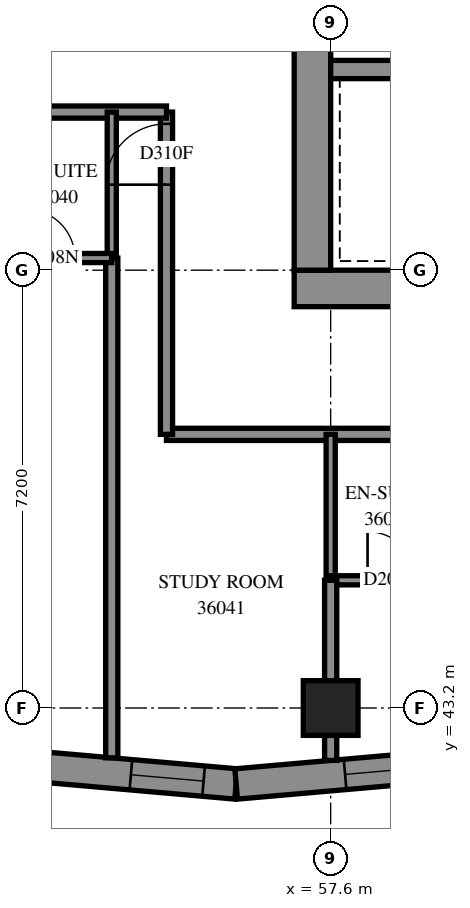
"""IFC4 building model, lengths in metres.
Left out: names, types, materials, properties, quantities, classifications, styles, units other than length and angle.
Written with IfcOpenShell. Run it as: python <this file> out.ifc"""

import sys

from ifc_helpers import new_model, si_unit, direction, frame, frame_2d, origin, origin_2d, place, context, subcontext, project, spatial, polyline, rectangle, outline, extrude, element, fill, save


model = new_model("IFC4")
c1 = context("Model", 3, precision=1e-05, world=origin(), true_north=direction((0.0, 1.0)))
c2 = subcontext(c1, "Body", "Model", "MODEL_VIEW")
j1 = project(units=[si_unit("LENGTHUNIT", "METRE"), si_unit("PLANEANGLEUNIT", "RADIAN")], contexts=[c1])
p1 = place(None, origin())
s1 = spatial("IfcSite", under=j1, at=p1, CompositionType="ELEMENT")
p2 = place(p1, origin())
s2 = spatial("IfcBuilding", under=s1, at=p2, CompositionType="ELEMENT")
p3 = place(p2, frame((0.0, 0.0, 135.4)))
s3 = spatial("IfcBuildingStorey", under=s2, at=p3, CompositionType="ELEMENT", Elevation=135.4)
p4 = place(p3, frame((57.6, 43.2, 0.0), z_axis=(0.0, 0.0, 1.0), x_axis=(1.0, 0.0, 0.0)))
e1 = element("IfcColumn", 1, at=p4, inside=s3, PredefinedType="COLUMN", context=c2, shape_type="SweptSolid", body=[
    extrude(rectangle(XDim=0.9, YDim=0.9, at=origin_2d()), origin(), (0.0, 0.0, 1.0), 3.1),
])
p5 = place(p3, frame((57.0, 50.1, -0.3), z_axis=(0.0, 0.0, 1.0), x_axis=(1.0, 0.0, 0.0)))
e2 = element("IfcWall", 2, at=p5, inside=s3, PredefinedType="SHEAR", context=c2, shape_type="SweptSolid", body=[
    extrude(rectangle(XDim=15.6, YDim=0.6, at=frame_2d((7.8, 0.0))), origin(), (0.0, 0.0, 1.0), 2.7),
])
p6 = place(p3, frame((57.3, 50.4, -0.3), z_axis=(0.0, 0.0, 1.0), x_axis=(0.0, 1.0, 0.0)))
e3 = element("IfcWall", 3, at=p6, inside=s3, PredefinedType="SHEAR", context=c2, shape_type="SweptSolid", body=[
    extrude(rectangle(XDim=14.4, YDim=0.6, at=frame_2d((7.2, 0.0))), origin(), (0.0, 0.0, 1.0), 2.7),
])
p7 = place(p6, frame((4.55, 0.0, 0.3)))
e4 = element("IfcOpeningElement", 4, at=p7, cuts=e3, PredefinedType="OPENING", context=c2, shape_type="SweptSolid", body=[
    extrude(rectangle(XDim=1.1, YDim=2.1, at=frame_2d((0.55, 1.05))), frame((0.0, 0.31, 0.0), z_axis=(0.0, -1.0, 0.0), x_axis=(1.0, 0.0, 0.0)), (0.0, 0.0, 1.0), 0.62),
])
p8 = place(p6, frame((11.35, 0.0, 0.3)))
e5 = element("IfcOpeningElement", 5, at=p8, cuts=e3, PredefinedType="OPENING", context=c2, shape_type="SweptSolid", body=[
    extrude(rectangle(XDim=1.1, YDim=2.1, at=frame_2d((0.55, 1.05))), frame((0.0, 0.31, 0.0), z_axis=(0.0, -1.0, 0.0), x_axis=(1.0, 0.0, 0.0)), (0.0, 0.0, 1.0), 0.62),
])
p9 = place(p3, frame((57.6, 53.7, 0.0), z_axis=(0.0, 0.0, 1.0), x_axis=(1.0, 0.0, 0.0)))
e6 = element("IfcWall", 6, at=p9, inside=s3, PredefinedType="SOLIDWALL", context=c2, shape_type="SweptSolid", body=[
    extrude(rectangle(XDim=14.4, YDim=0.3, at=frame_2d((7.2, 0.0))), origin(), (0.0, 0.0, 1.0), 3.1),
])
p10 = place(p9, frame((12.05, 0.0, 0.0)))
e7 = element("IfcOpeningElement", 7, at=p10, cuts=e6, PredefinedType="OPENING", context=c2, shape_type="SweptSolid", body=[
    extrude(rectangle(XDim=1.1, YDim=2.1, at=frame_2d((0.55, 1.05))), frame((0.0, 0.16, 0.0), z_axis=(0.0, -1.0, 0.0), x_axis=(1.0, 0.0, 0.0)), (0.0, 0.0, 1.0), 0.32),
])
p11 = place(p3, frame((52.601, 42.253, 0.0), z_axis=(0.0, 0.0, 1.0), x_axis=(0.9961832879, -0.0872860633, 0.0)))
e8 = element("IfcWall", 8, at=p11, inside=s3, PredefinedType="SOLIDWALL", context=c2, shape_type="SweptSolid", body=[
    extrude(outline(polyline([(0.043, -0.25), (3.479, -0.25), (3.436, 0.25), (-0.043, 0.25), (0.043, -0.25)])), origin(), (0.0, 0.0, 1.0), 3.1),
])
p12 = place(p11, frame((1.72, 0.0, 0.45)))
e9 = element("IfcOpeningElement", 9, at=p12, cuts=e8, PredefinedType="OPENING", context=c2, shape_type="SweptSolid", body=[
    extrude(rectangle(XDim=1.2, YDim=2.5, at=frame_2d((0.6, 1.25))), frame((0.0, 0.26, 0.0), z_axis=(0.0, -1.0, 0.0), x_axis=(1.0, 0.0, 0.0)), (0.0, 0.0, 1.0), 0.52),
])
p13 = place(p3, frame((56.046, 41.951, 0.0), z_axis=(0.0, 0.0, 1.0), x_axis=(0.996181166, 0.0873102778, 0.0)))
e10 = element("IfcWall", 10, at=p13, inside=s3, PredefinedType="SOLIDWALL", context=c2, shape_type="SweptSolid", body=[
    extrude(outline(polyline([(-0.022, -0.25), (3.414, -0.25), (3.458, 0.25), (0.022, 0.25), (-0.022, -0.25)])), origin(), (0.0, 0.0, 1.0), 3.1),
])
p14 = place(p13, frame((1.798, 0.0, 0.45)))
e11 = element("IfcOpeningElement", 11, at=p14, cuts=e10, PredefinedType="OPENING", context=c2, shape_type="SweptSolid", body=[
    extrude(rectangle(XDim=1.2, YDim=2.5, at=frame_2d((0.6, 1.25))), frame((0.0, 0.26, 0.0), z_axis=(0.0, -1.0, 0.0), x_axis=(1.0, 0.0, 0.0)), (0.0, 0.0, 1.0), 0.52),
])
p15 = place(p3, frame((54.9, 47.7, 0.0), z_axis=(0.0, 0.0, 1.0), x_axis=(1.0, 0.0, 0.0)))
e12 = element("IfcWall", 12, at=p15, inside=s3, PredefinedType="PARTITIONING", context=c2, shape_type="SweptSolid", body=[
    extrude(rectangle(XDim=19.326, YDim=0.2, at=frame_2d((9.663, 0.0))), origin(), (0.0, 0.0, 1.0), 3.1),
])
p16 = place(p15, frame((5.0, 0.0, 0.0)))
e13 = element("IfcOpeningElement", 13, at=p16, cuts=e12, PredefinedType="OPENING", context=c2, shape_type="SweptSolid", body=[
    extrude(rectangle(XDim=0.9, YDim=2.1, at=frame_2d((0.45, 1.05))), frame((0.0, 0.11, 0.0), z_axis=(0.0, -1.0, 0.0), x_axis=(1.0, 0.0, 0.0)), (0.0, 0.0, 1.0), 0.22),
])
p17 = place(p15, frame((12.2, 0.0, 0.0)))
e14 = element("IfcOpeningElement", 14, at=p17, cuts=e12, PredefinedType="OPENING", context=c2, shape_type="SweptSolid", body=[
    extrude(rectangle(XDim=0.9, YDim=2.1, at=frame_2d((0.45, 1.05))), frame((0.0, 0.11, 0.0), z_axis=(0.0, -1.0, 0.0), x_axis=(1.0, 0.0, 0.0)), (0.0, 0.0, 1.0), 0.22),
])
p18 = place(p15, frame((6.7, 0.0, 0.0)))
e15 = element("IfcOpeningElement", 15, at=p18, cuts=e12, PredefinedType="OPENING", context=c2, shape_type="SweptSolid", body=[
    extrude(rectangle(XDim=0.9, YDim=2.1, at=frame_2d((0.45, 1.05))), frame((0.0, 0.11, 0.0), z_axis=(0.0, -1.0, 0.0), x_axis=(1.0, 0.0, 0.0)), (0.0, 0.0, 1.0), 0.22),
])
p19 = place(p15, frame((13.9, 0.0, 0.0)))
e16 = element("IfcOpeningElement", 16, at=p19, cuts=e12, PredefinedType="OPENING", context=c2, shape_type="SweptSolid", body=[
    extrude(rectangle(XDim=0.9, YDim=2.1, at=frame_2d((0.45, 1.05))), frame((0.0, 0.11, 0.0), z_axis=(0.0, -1.0, 0.0), x_axis=(1.0, 0.0, 0.0)), (0.0, 0.0, 1.0), 0.22),
])
p20 = place(p3, frame((54.0, 42.381, 0.0), z_axis=(0.0, 0.0, 1.0), x_axis=(0.0, 1.0, 0.0)))
e17 = element("IfcWall", 17, at=p20, inside=s3, PredefinedType="PARTITIONING", context=c2, shape_type="SweptSolid", body=[
    extrude(rectangle(XDim=8.219, YDim=0.2, at=frame_2d((4.109, 0.0))), origin(), (0.0, 0.0, 1.0), 3.1),
])
p21 = place(p3, frame((54.9, 47.7, 0.0), z_axis=(0.0, 0.0, 1.0), x_axis=(0.0, 1.0, 0.0)))
e18 = element("IfcWall", 18, at=p21, inside=s3, PredefinedType="PARTITIONING", context=c2, shape_type="SweptSolid", body=[
    extrude(rectangle(XDim=5.3, YDim=0.2, at=frame_2d((2.65, 0.0))), origin(), (0.0, 0.0, 1.0), 3.1),
])
p22 = place(p21, frame((4.106, 0.0, 0.0)))
e19 = element("IfcOpeningElement", 19, at=p22, cuts=e18, PredefinedType="OPENING", context=c2, shape_type="SweptSolid", body=[
    extrude(rectangle(XDim=1.0, YDim=2.1, at=frame_2d((0.5, 1.05))), frame((0.0, 0.11, 0.0), z_axis=(0.0, -1.0, 0.0), x_axis=(1.0, 0.0, 0.0)), (0.0, 0.0, 1.0), 0.22),
])
p23 = place(p3, frame((50.4, 53.0, 0.0), z_axis=(0.0, 0.0, 1.0), x_axis=(1.0, 0.0, 0.0)))
e20 = element("IfcWall", 20, at=p23, inside=s3, PredefinedType="PARTITIONING", context=c2, shape_type="SweptSolid", body=[
    extrude(rectangle(XDim=4.5, YDim=0.2, at=frame_2d((2.25, 0.0))), origin(), (0.0, 0.0, 1.0), 3.1),
])
p24 = place(p23, frame((0.4, 0.0, 0.0)))
e21 = element("IfcOpeningElement", 21, at=p24, cuts=e20, PredefinedType="OPENING", context=c2, shape_type="SweptSolid", body=[
    extrude(rectangle(XDim=0.9, YDim=2.1, at=frame_2d((0.45, 1.05))), frame((0.0, 0.11, 0.0), z_axis=(0.0, -1.0, 0.0), x_axis=(1.0, 0.0, 0.0)), (0.0, 0.0, 1.0), 0.22),
])
for number, where, z_axis, x_axis in (
    (22, (57.6, 45.3, 0.0), (0.0, 0.0, 1.0), (0.0, 1.0, 0.0)),
    (23, (54.0, 50.6, 0.0), (0.0, 0.0, 1.0), (0.0, 1.0, 0.0)),
):
    element("IfcWall", number, at=place(p3, frame(where, z_axis=z_axis, x_axis=x_axis)), inside=s3, PredefinedType="PARTITIONING", context=c2, shape_type="SweptSolid", body=[
        extrude(rectangle(XDim=2.4, YDim=0.15, at=frame_2d((1.2, 0.0))), origin(), (0.0, 0.0, 1.0), 3.1),
    ])
p25 = place(p3, frame((52.1, 50.6, 0.0), z_axis=(0.0, 0.0, 1.0), x_axis=(1.0, 0.0, 0.0)))
e24 = element("IfcWall", 24, at=p25, inside=s3, PredefinedType="PARTITIONING", context=c2, shape_type="SweptSolid", body=[
    extrude(rectangle(XDim=1.9, YDim=0.15, at=frame_2d((0.95, 0.0))), origin(), (0.0, 0.0, 1.0), 3.1),
])
p26 = place(p25, frame((0.493, 0.0, 0.0)))
e25 = element("IfcOpeningElement", 25, at=p26, cuts=e24, PredefinedType="OPENING", context=c2, shape_type="SweptSolid", body=[
    extrude(rectangle(XDim=0.8, YDim=2.1, at=frame_2d((0.4, 1.05))), frame((0.0, 0.085, 0.0), z_axis=(0.0, -1.0, 0.0), x_axis=(1.0, 0.0, 0.0)), (0.0, 0.0, 1.0), 0.17),
])
p27 = place(p3, frame((57.6, 45.3, 0.0), z_axis=(0.0, 0.0, 1.0), x_axis=(1.0, 0.0, 0.0)))
e26 = element("IfcWall", 26, at=p27, inside=s3, PredefinedType="PARTITIONING", context=c2, shape_type="SweptSolid", body=[
    extrude(rectangle(XDim=1.9, YDim=0.15, at=frame_2d((0.95, 0.0))), origin(), (0.0, 0.0, 1.0), 3.1),
])
p28 = place(p27, frame((0.607, 0.0, 0.0)))
e27 = element("IfcOpeningElement", 27, at=p28, cuts=e26, PredefinedType="OPENING", context=c2, shape_type="SweptSolid", body=[
    extrude(rectangle(XDim=0.8, YDim=2.1, at=frame_2d((0.4, 1.05))), frame((0.0, 0.085, 0.0), z_axis=(0.0, -1.0, 0.0), x_axis=(1.0, 0.0, 0.0)), (0.0, 0.0, 1.0), 0.17),
])
p29 = place(p3, frame((57.6, 43.65, 0.0), z_axis=(0.0, 0.0, 1.0), x_axis=(0.0, 1.0, 0.0)))
e28 = element("IfcWall", 28, at=p29, inside=s3, PredefinedType="PARTITIONING", context=c2, shape_type="SweptSolid", body=[
    extrude(rectangle(XDim=1.65, YDim=0.2, at=frame_2d((0.825, 0.0))), origin(), (0.0, 0.0, 1.0), 3.1),
])
p30 = place(p3, frame((57.6, 42.338, 0.0), z_axis=(0.0, 0.0, 1.0), x_axis=(0.0, 1.0, 0.0)))
e29 = element("IfcWall", 29, at=p30, inside=s3, PredefinedType="PARTITIONING", context=c2, shape_type="SweptSolid", body=[
    extrude(rectangle(XDim=0.412, YDim=0.2, at=frame_2d((0.206, 0.0))), origin(), (0.0, 0.0, 1.0), 3.1),
])
p31 = place(p12, origin())
e30 = element("IfcWindow", 30, at=p31, inside=s3, PartitioningType="SINGLE_PANEL", PredefinedType="WINDOW", context=c2, shape_type="SweptSolid", body=[
    extrude(rectangle(XDim=1.2, YDim=2.5, at=frame_2d((0.6, 1.25))), frame((0.0, 0.18, 0.0), z_axis=(0.0, -1.0, 0.0), x_axis=(1.0, 0.0, 0.0)), (0.0, 0.0, 1.0), 0.06),
])
fill(e9, e30)
p32 = place(p14, origin())
e31 = element("IfcWindow", 31, at=p32, inside=s3, PartitioningType="SINGLE_PANEL", PredefinedType="WINDOW", context=c2, shape_type="SweptSolid", body=[
    extrude(rectangle(XDim=1.2, YDim=2.5, at=frame_2d((0.6, 1.25))), frame((0.0, 0.18, 0.0), z_axis=(0.0, -1.0, 0.0), x_axis=(1.0, 0.0, 0.0)), (0.0, 0.0, 1.0), 0.06),
])
fill(e11, e31)
p33 = place(p26, origin())
e32 = element("IfcDoor", 32, at=p33, inside=s3, OperationType="SINGLE_SWING_RIGHT", PredefinedType="DOOR", context=c2, shape_type="SweptSolid", body=[
    extrude(rectangle(XDim=0.8, YDim=2.1, at=frame_2d((0.4, 1.05))), frame((0.0, 0.025, 0.0), z_axis=(0.0, -1.0, 0.0), x_axis=(1.0, 0.0, 0.0)), (0.0, 0.0, 1.0), 0.05),
])
fill(e25, e32)
p34 = place(p22, origin())
e33 = element("IfcDoor", 33, at=p34, inside=s3, OperationType="SINGLE_SWING_RIGHT", PredefinedType="DOOR", context=c2, shape_type="SweptSolid", body=[
    extrude(rectangle(XDim=1.0, YDim=2.1, at=frame_2d((0.5, 1.05))), frame((0.0, 0.025, 0.0), z_axis=(0.0, -1.0, 0.0), x_axis=(1.0, 0.0, 0.0)), (0.0, 0.0, 1.0), 0.05),
])
fill(e19, e33)
p35 = place(p28, origin())
e34 = element("IfcDoor", 34, at=p35, inside=s3, OperationType="SINGLE_SWING_RIGHT", PredefinedType="DOOR", context=c2, shape_type="SweptSolid", body=[
    extrude(rectangle(XDim=0.8, YDim=2.1, at=frame_2d((0.4, 1.05))), frame((0.0, 0.025, 0.0), z_axis=(0.0, -1.0, 0.0), x_axis=(1.0, 0.0, 0.0)), (0.0, 0.0, 1.0), 0.05),
])
fill(e27, e34)
save(model, sys.argv[1])
